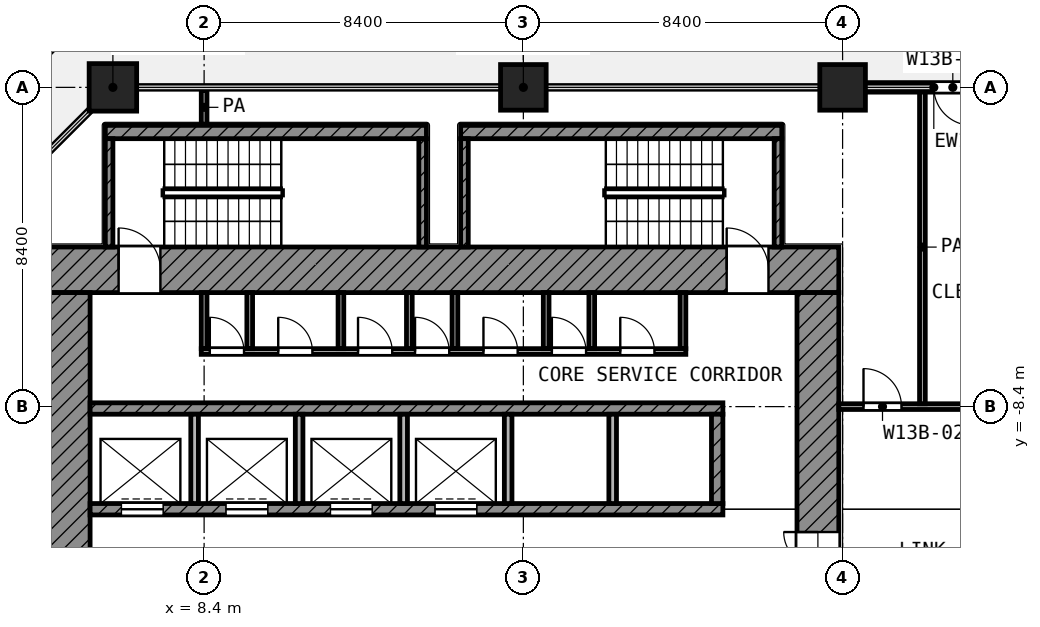
"""IFC4 building model, lengths in metres.
Left out: names, types, materials, properties, quantities, classifications, styles, units other than length and angle.
Written with IfcOpenShell. Run it as: python <this file> out.ifc"""

import sys

from ifc_helpers import new_model, si_unit, direction, frame, frame_2d, origin, origin_2d, place, context, subcontext, project, spatial, rectangle, extrude, element, fill, save


model = new_model("IFC4")
c1 = context("Model", 3, precision=1e-05, world=origin(), true_north=direction((0.0, 1.0)))
c2 = subcontext(c1, "Body", "Model", "MODEL_VIEW")
j1 = project(units=[si_unit("LENGTHUNIT", "METRE"), si_unit("PLANEANGLEUNIT", "RADIAN")], contexts=[c1])
p1 = place(None, origin())
s1 = spatial("IfcSite", under=j1, at=p1, CompositionType="ELEMENT")
p2 = place(p1, origin())
s2 = spatial("IfcBuilding", under=s1, at=p2, CompositionType="ELEMENT")
p3 = place(p2, frame((0.0, 0.0, 89.6)))
s3 = spatial("IfcBuildingStorey", under=s2, at=p3, CompositionType="ELEMENT", Elevation=89.6)
p4 = place(p3, frame((6.0, 0.0, 0.0), z_axis=(0.0, 0.0, 1.0), x_axis=(1.0, 0.0, 0.0)))
e1 = element("IfcColumn", 1, at=p4, inside=s3, PredefinedType="COLUMN", context=c2, shape_type="SweptSolid", body=[
    extrude(rectangle(XDim=1.25, YDim=1.25, at=origin_2d()), origin(), (0.0, 0.0, 1.0), 4.2),
])
for number, where, z_axis, x_axis in (
    (2, (16.8, 0.0, 0.0), (0.0, 0.0, 1.0), (1.0, 0.0, 0.0)),
    (3, (25.2, 0.0, 0.0), (0.0, 0.0, 1.0), (1.0, 0.0, 0.0)),
):
    element("IfcColumn", number, at=place(p3, frame(where, z_axis=z_axis, x_axis=x_axis)), inside=s3, PredefinedType="COLUMN", context=c2, shape_type="SweptSolid", body=[
        extrude(rectangle(XDim=1.2, YDim=1.2, at=origin_2d()), origin(), (0.0, 0.0, 1.0), 4.2),
    ])
p5 = place(p3, frame((29.4, 0.0, 0.0), z_axis=(0.0, 0.0, 1.0), x_axis=(-1.0, 0.0, 0.0)))
e4 = element("IfcWall", 4, at=p5, inside=s3, PredefinedType="SOLIDWALL", context=c2, shape_type="SweptSolid", body=[
    extrude(rectangle(XDim=3.6, YDim=0.25, at=frame_2d((1.8, 0.0))), origin(), (0.0, 0.0, 1.0), 3.58),
])
p6 = place(p5, frame((0.8, 0.0, 0.0)))
e5 = element("IfcOpeningElement", 5, at=p6, cuts=e4, PredefinedType="OPENING", context=c2, shape_type="SweptSolid", body=[
    extrude(rectangle(XDim=1.0, YDim=2.1, at=frame_2d((0.5, 1.05))), frame((0.0, 0.135, 0.0), z_axis=(0.0, -1.0, 0.0), x_axis=(1.0, 0.0, 0.0)), (0.0, 0.0, 1.0), 0.27),
])
p7 = place(p3, frame((4.2, -4.8, 0.0), z_axis=(0.0, 0.0, 1.0), x_axis=(1.0, 0.0, 0.0)))
e6 = element("IfcWall", 6, at=p7, inside=s3, PredefinedType="SHEAR", context=c2, shape_type="SweptSolid", body=[
    extrude(rectangle(XDim=20.9, YDim=1.2, at=frame_2d((10.45, 0.0))), origin(), (0.0, 0.0, 1.0), 3.7),
])
p8 = place(p7, frame((1.95, 0.0, 0.0)))
e7 = element("IfcOpeningElement", 7, at=p8, cuts=e6, PredefinedType="OPENING", context=c2, shape_type="SweptSolid", body=[
    extrude(rectangle(XDim=1.1, YDim=2.1, at=frame_2d((0.55, 1.05))), frame((0.0, 0.61, 0.0), z_axis=(0.0, -1.0, 0.0), x_axis=(1.0, 0.0, 0.0)), (0.0, 0.0, 1.0), 1.22),
])
p9 = place(p7, frame((17.95, 0.0, 0.0)))
e8 = element("IfcOpeningElement", 8, at=p9, cuts=e6, PredefinedType="OPENING", context=c2, shape_type="SweptSolid", body=[
    extrude(rectangle(XDim=1.1, YDim=2.1, at=frame_2d((0.55, 1.05))), frame((0.0, 0.61, 0.0), z_axis=(0.0, -1.0, 0.0), x_axis=(1.0, 0.0, 0.0)), (0.0, 0.0, 1.0), 1.22),
])
p10 = place(p3, frame((4.8, -25.1, 0.0), z_axis=(0.0, 0.0, 1.0), x_axis=(0.0, 1.0, 0.0)))
e9 = element("IfcWall", 9, at=p10, inside=s3, PredefinedType="SHEAR", context=c2, shape_type="SweptSolid", body=[
    extrude(rectangle(XDim=19.7, YDim=1.2, at=frame_2d((9.85, 0.0))), origin(), (0.0, 0.0, 1.0), 3.7),
])
p11 = place(p10, frame((11.55, 0.0, 0.0)))
e10 = element("IfcOpeningElement", 10, at=p11, cuts=e9, PredefinedType="OPENING", context=c2, shape_type="SweptSolid", body=[
    extrude(rectangle(XDim=1.1, YDim=2.1, at=frame_2d((0.55, 1.05))), frame((0.0, 0.61, 0.0), z_axis=(0.0, -1.0, 0.0), x_axis=(1.0, 0.0, 0.0)), (0.0, 0.0, 1.0), 1.22),
])
p12 = place(p10, frame((2.25, 0.0, 0.0)))
e11 = element("IfcOpeningElement", 11, at=p12, cuts=e9, PredefinedType="OPENING", context=c2, shape_type="SweptSolid", body=[
    extrude(rectangle(XDim=1.1, YDim=2.1, at=frame_2d((0.55, 1.05))), frame((0.0, 0.61, 0.0), z_axis=(0.0, -1.0, 0.0), x_axis=(1.0, 0.0, 0.0)), (0.0, 0.0, 1.0), 1.22),
])
p13 = place(p3, frame((24.55, -24.0, 0.0), z_axis=(0.0, 0.0, 1.0), x_axis=(0.0, 1.0, 0.0)))
e12 = element("IfcWall", 12, at=p13, inside=s3, PredefinedType="SHEAR", context=c2, shape_type="SweptSolid", body=[
    extrude(rectangle(XDim=18.6, YDim=1.1, at=frame_2d((9.3, 0.0))), origin(), (0.0, 0.0, 1.0), 3.7),
])
p14 = place(p13, frame((10.5, 0.0, 0.0)))
e13 = element("IfcOpeningElement", 13, at=p14, cuts=e12, PredefinedType="OPENING", context=c2, shape_type="SweptSolid", body=[
    extrude(rectangle(XDim=1.8, YDim=2.1, at=frame_2d((0.9, 1.05))), frame((0.0, 0.56, 0.0), z_axis=(0.0, -1.0, 0.0), x_axis=(1.0, 0.0, 0.0)), (0.0, 0.0, 1.0), 1.12),
])
p15 = place(p3, frame((5.4, -8.45, 0.0), z_axis=(0.0, 0.0, 1.0), x_axis=(1.0, 0.0, 0.0)))
e14 = element("IfcWall", 14, at=p15, inside=s3, PredefinedType="SHEAR", context=c2, shape_type="SweptSolid", body=[
    extrude(rectangle(XDim=16.65, YDim=0.3, at=frame_2d((8.325, 0.0))), origin(), (0.0, 0.0, 1.0), 3.7),
])
p16 = place(p3, frame((5.4, -11.1, 0.0), z_axis=(0.0, 0.0, 1.0), x_axis=(1.0, 0.0, 0.0)))
e15 = element("IfcWall", 15, at=p16, inside=s3, PredefinedType="SHEAR", context=c2, shape_type="SweptSolid", body=[
    extrude(rectangle(XDim=16.65, YDim=0.3, at=frame_2d((8.325, 0.0))), origin(), (0.0, 0.0, 1.0), 3.7),
])
p17 = place(p16, frame((0.825, 0.0, 0.0)))
e16 = element("IfcOpeningElement", 16, at=p17, cuts=e15, PredefinedType="OPENING", context=c2, shape_type="SweptSolid", body=[
    extrude(rectangle(XDim=1.1, YDim=2.1, at=frame_2d((0.55, 1.05))), frame((0.0, 0.16, 0.0), z_axis=(0.0, -1.0, 0.0), x_axis=(1.0, 0.0, 0.0)), (0.0, 0.0, 1.0), 0.32),
])
p18 = place(p16, frame((3.575, 0.0, 0.0)))
e17 = element("IfcOpeningElement", 17, at=p18, cuts=e15, PredefinedType="OPENING", context=c2, shape_type="SweptSolid", body=[
    extrude(rectangle(XDim=1.1, YDim=2.1, at=frame_2d((0.55, 1.05))), frame((0.0, 0.16, 0.0), z_axis=(0.0, -1.0, 0.0), x_axis=(1.0, 0.0, 0.0)), (0.0, 0.0, 1.0), 0.32),
])
p19 = place(p16, frame((6.325, 0.0, 0.0)))
e18 = element("IfcOpeningElement", 18, at=p19, cuts=e15, PredefinedType="OPENING", context=c2, shape_type="SweptSolid", body=[
    extrude(rectangle(XDim=1.1, YDim=2.1, at=frame_2d((0.55, 1.05))), frame((0.0, 0.16, 0.0), z_axis=(0.0, -1.0, 0.0), x_axis=(1.0, 0.0, 0.0)), (0.0, 0.0, 1.0), 0.32),
])
p20 = place(p16, frame((9.075, 0.0, 0.0)))
e19 = element("IfcOpeningElement", 19, at=p20, cuts=e15, PredefinedType="OPENING", context=c2, shape_type="SweptSolid", body=[
    extrude(rectangle(XDim=1.1, YDim=2.1, at=frame_2d((0.55, 1.05))), frame((0.0, 0.16, 0.0), z_axis=(0.0, -1.0, 0.0), x_axis=(1.0, 0.0, 0.0)), (0.0, 0.0, 1.0), 0.32),
])
p21 = place(p3, frame((21.9, -10.95, 0.0), z_axis=(0.0, 0.0, 1.0), x_axis=(0.0, 1.0, 0.0)))
e20 = element("IfcWall", 20, at=p21, inside=s3, PredefinedType="SHEAR", context=c2, shape_type="SweptSolid", body=[
    extrude(rectangle(XDim=2.35, YDim=0.3, at=frame_2d((1.175, 0.0))), origin(), (0.0, 0.0, 1.0), 3.7),
])
for number, where, z_axis, x_axis in (
    (21, (8.15, -10.95, 0.0), (0.0, 0.0, 1.0), (0.0, 1.0, 0.0)),
    (22, (10.9, -10.95, 0.0), (0.0, 0.0, 1.0), (0.0, 1.0, 0.0)),
    (23, (13.65, -10.95, 0.0), (0.0, 0.0, 1.0), (0.0, 1.0, 0.0)),
    (24, (16.4, -10.95, 0.0), (0.0, 0.0, 1.0), (0.0, 1.0, 0.0)),
    (25, (19.15, -10.95, 0.0), (0.0, 0.0, 1.0), (0.0, 1.0, 0.0)),
):
    element("IfcWall", number, at=place(p3, frame(where, z_axis=z_axis, x_axis=x_axis)), inside=s3, PredefinedType="PARTITIONING", context=c2, shape_type="SweptSolid", body=[
        extrude(rectangle(XDim=2.35, YDim=0.2, at=frame_2d((1.175, 0.0))), origin(), (0.0, 0.0, 1.0), 3.7),
    ])
p22 = place(p3, frame((8.325, -6.95, 0.0), z_axis=(0.0, 0.0, 1.0), x_axis=(1.0, 0.0, 0.0)))
e26 = element("IfcWall", 26, at=p22, inside=s3, PredefinedType="PARTITIONING", context=c2, shape_type="SweptSolid", body=[
    extrude(rectangle(XDim=12.75, YDim=0.15, at=frame_2d((6.375, 0.0))), origin(), (0.0, 0.0, 1.0), 3.7),
])
p23 = place(p22, frame((0.225, 0.0, 0.0)))
e27 = element("IfcOpeningElement", 27, at=p23, cuts=e26, PredefinedType="OPENING", context=c2, shape_type="SweptSolid", body=[
    extrude(rectangle(XDim=0.9, YDim=2.1, at=frame_2d((0.45, 1.05))), frame((0.0, 0.085, 0.0), z_axis=(0.0, -1.0, 0.0), x_axis=(1.0, 0.0, 0.0)), (0.0, 0.0, 1.0), 0.17),
])
p24 = place(p22, frame((2.025, 0.0, 0.0)))
e28 = element("IfcOpeningElement", 28, at=p24, cuts=e26, PredefinedType="OPENING", context=c2, shape_type="SweptSolid", body=[
    extrude(rectangle(XDim=0.9, YDim=2.1, at=frame_2d((0.45, 1.05))), frame((0.0, 0.085, 0.0), z_axis=(0.0, -1.0, 0.0), x_axis=(1.0, 0.0, 0.0)), (0.0, 0.0, 1.0), 0.17),
])
p25 = place(p22, frame((4.125, 0.0, 0.0)))
e29 = element("IfcOpeningElement", 29, at=p25, cuts=e26, PredefinedType="OPENING", context=c2, shape_type="SweptSolid", body=[
    extrude(rectangle(XDim=0.9, YDim=2.1, at=frame_2d((0.45, 1.05))), frame((0.0, 0.085, 0.0), z_axis=(0.0, -1.0, 0.0), x_axis=(1.0, 0.0, 0.0)), (0.0, 0.0, 1.0), 0.17),
])
p26 = place(p22, frame((5.625, 0.0, 0.0)))
e30 = element("IfcOpeningElement", 30, at=p26, cuts=e26, PredefinedType="OPENING", context=c2, shape_type="SweptSolid", body=[
    extrude(rectangle(XDim=0.9, YDim=2.1, at=frame_2d((0.45, 1.05))), frame((0.0, 0.085, 0.0), z_axis=(0.0, -1.0, 0.0), x_axis=(1.0, 0.0, 0.0)), (0.0, 0.0, 1.0), 0.17),
])
p27 = place(p22, frame((7.425, 0.0, 0.0)))
e31 = element("IfcOpeningElement", 31, at=p27, cuts=e26, PredefinedType="OPENING", context=c2, shape_type="SweptSolid", body=[
    extrude(rectangle(XDim=0.9, YDim=2.1, at=frame_2d((0.45, 1.05))), frame((0.0, 0.085, 0.0), z_axis=(0.0, -1.0, 0.0), x_axis=(1.0, 0.0, 0.0)), (0.0, 0.0, 1.0), 0.17),
])
p28 = place(p22, frame((9.225, 0.0, 0.0)))
e32 = element("IfcOpeningElement", 32, at=p28, cuts=e26, PredefinedType="OPENING", context=c2, shape_type="SweptSolid", body=[
    extrude(rectangle(XDim=0.9, YDim=2.1, at=frame_2d((0.45, 1.05))), frame((0.0, 0.085, 0.0), z_axis=(0.0, -1.0, 0.0), x_axis=(1.0, 0.0, 0.0)), (0.0, 0.0, 1.0), 0.17),
])
p29 = place(p22, frame((11.025, 0.0, 0.0)))
e33 = element("IfcOpeningElement", 33, at=p29, cuts=e26, PredefinedType="OPENING", context=c2, shape_type="SweptSolid", body=[
    extrude(rectangle(XDim=0.9, YDim=2.1, at=frame_2d((0.45, 1.05))), frame((0.0, 0.085, 0.0), z_axis=(0.0, -1.0, 0.0), x_axis=(1.0, 0.0, 0.0)), (0.0, 0.0, 1.0), 0.17),
])
for number, where, z_axis, x_axis in (
    (34, (8.4, -6.875, 0.0), (0.0, 0.0, 1.0), (0.0, 1.0, 0.0)),
    (35, (9.6, -6.875, 0.0), (0.0, 0.0, 1.0), (0.0, 1.0, 0.0)),
    (36, (12.0, -6.875, 0.0), (0.0, 0.0, 1.0), (0.0, 1.0, 0.0)),
    (37, (13.8, -6.875, 0.0), (0.0, 0.0, 1.0), (0.0, 1.0, 0.0)),
    (38, (15.0, -6.875, 0.0), (0.0, 0.0, 1.0), (0.0, 1.0, 0.0)),
    (39, (17.4, -6.875, 0.0), (0.0, 0.0, 1.0), (0.0, 1.0, 0.0)),
    (40, (18.6, -6.875, 0.0), (0.0, 0.0, 1.0), (0.0, 1.0, 0.0)),
    (41, (21.0, -6.875, 0.0), (0.0, 0.0, 1.0), (0.0, 1.0, 0.0)),
):
    element("IfcWall", number, at=place(p3, frame(where, z_axis=z_axis, x_axis=x_axis)), inside=s3, PredefinedType="PARTITIONING", context=c2, shape_type="SweptSolid", body=[
        extrude(rectangle(XDim=1.475, YDim=0.15, at=frame_2d((0.738, 0.0))), origin(), (0.0, 0.0, 1.0), 3.7),
    ])
p30 = place(p3, frame((5.8, -1.175, 0.0), z_axis=(0.0, 0.0, 1.0), x_axis=(1.0, 0.0, 0.0)))
e42 = element("IfcWall", 42, at=p30, inside=s3, PredefinedType="SHEAR", context=c2, shape_type="SweptSolid", body=[
    extrude(rectangle(XDim=8.45, YDim=0.35, at=frame_2d((4.225, 0.0))), origin(), (0.0, 0.0, 1.0), 3.7),
])
for number, where, z_axis, x_axis in (
    (43, (5.9, -4.2, 0.0), (0.0, 0.0, 1.0), (0.0, 1.0, 0.0)),
    (44, (14.15, -4.2, 0.0), (0.0, 0.0, 1.0), (0.0, 1.0, 0.0)),
):
    element("IfcWall", number, at=place(p3, frame(where, z_axis=z_axis, x_axis=x_axis)), inside=s3, PredefinedType="SHEAR", context=c2, shape_type="SweptSolid", body=[
        extrude(rectangle(XDim=2.85, YDim=0.2, at=frame_2d((1.425, 0.0))), origin(), (0.0, 0.0, 1.0), 3.7),
    ])
p31 = place(p3, frame((15.15, -1.175, 0.0), z_axis=(0.0, 0.0, 1.0), x_axis=(1.0, 0.0, 0.0)))
e45 = element("IfcWall", 45, at=p31, inside=s3, PredefinedType="SHEAR", context=c2, shape_type="SweptSolid", body=[
    extrude(rectangle(XDim=8.45, YDim=0.35, at=frame_2d((4.225, 0.0))), origin(), (0.0, 0.0, 1.0), 3.7),
])
for number, where, z_axis, x_axis in (
    (46, (15.25, -4.2, 0.0), (0.0, 0.0, 1.0), (0.0, 1.0, 0.0)),
    (47, (23.5, -4.2, 0.0), (0.0, 0.0, 1.0), (0.0, 1.0, 0.0)),
):
    element("IfcWall", number, at=place(p3, frame(where, z_axis=z_axis, x_axis=x_axis)), inside=s3, PredefinedType="SHEAR", context=c2, shape_type="SweptSolid", body=[
        extrude(rectangle(XDim=2.85, YDim=0.2, at=frame_2d((1.425, 0.0))), origin(), (0.0, 0.0, 1.0), 3.7),
    ])
p32 = place(p3, frame((25.1, -8.4, 0.0), z_axis=(0.0, 0.0, 1.0), x_axis=(1.0, 0.0, 0.0)))
e48 = element("IfcWall", 48, at=p32, inside=s3, PredefinedType="PARTITIONING", context=c2, shape_type="SweptSolid", body=[
    extrude(rectangle(XDim=14.932, YDim=0.15, at=frame_2d((7.466, 0.0))), origin(), (0.0, 0.0, 1.0), 3.7),
])
p33 = place(p32, frame((10.0, 0.0, 0.0)))
e49 = element("IfcOpeningElement", 49, at=p33, cuts=e48, PredefinedType="OPENING", context=c2, shape_type="SweptSolid", body=[
    extrude(rectangle(XDim=1.2, YDim=2.1, at=frame_2d((0.6, 1.05))), frame((0.0, 0.085, 0.0), z_axis=(0.0, -1.0, 0.0), x_axis=(1.0, 0.0, 0.0)), (0.0, 0.0, 1.0), 0.17),
])
p34 = place(p32, frame((0.65, 0.0, 0.0)))
e50 = element("IfcOpeningElement", 50, at=p34, cuts=e48, PredefinedType="OPENING", context=c2, shape_type="SweptSolid", body=[
    extrude(rectangle(XDim=1.0, YDim=2.1, at=frame_2d((0.5, 1.05))), frame((0.0, 0.085, 0.0), z_axis=(0.0, -1.0, 0.0), x_axis=(1.0, 0.0, 0.0)), (0.0, 0.0, 1.0), 0.17),
])
p35 = place(p32, frame((4.85, 0.0, 0.0)))
e51 = element("IfcOpeningElement", 51, at=p35, cuts=e48, PredefinedType="OPENING", context=c2, shape_type="SweptSolid", body=[
    extrude(rectangle(XDim=1.0, YDim=2.1, at=frame_2d((0.5, 1.05))), frame((0.0, 0.085, 0.0), z_axis=(0.0, -1.0, 0.0), x_axis=(1.0, 0.0, 0.0)), (0.0, 0.0, 1.0), 0.17),
])
p36 = place(p3, frame((8.4, -0.97, 0.0), z_axis=(0.0, 0.0, 1.0), x_axis=(0.0, 1.0, 0.0)))
e52 = element("IfcWall", 52, at=p36, inside=s3, PredefinedType="PARTITIONING", context=c2, shape_type="SweptSolid", body=[
    extrude(rectangle(XDim=0.89, YDim=0.15, at=frame_2d((0.445, 0.0))), origin(), (0.0, 0.0, 1.0), 3.7),
])
p37 = place(p3, frame((27.3, -8.325, 0.0), z_axis=(0.0, 0.0, 1.0), x_axis=(0.0, 1.0, 0.0)))
e53 = element("IfcWall", 53, at=p37, inside=s3, PredefinedType="PARTITIONING", context=c2, shape_type="SweptSolid", body=[
    extrude(rectangle(XDim=8.245, YDim=0.15, at=frame_2d((4.123, 0.0))), origin(), (0.0, 0.0, 1.0), 3.7),
])
p38 = place(p6, origin())
e54 = element("IfcDoor", 54, at=p38, inside=s3, OperationType="SINGLE_SWING_LEFT", PredefinedType="DOOR", context=c2, shape_type="SweptSolid", body=[
    extrude(rectangle(XDim=1.0, YDim=2.1, at=frame_2d((0.5, 1.05))), frame((0.0, 0.025, 0.0), z_axis=(0.0, -1.0, 0.0), x_axis=(1.0, 0.0, 0.0)), (0.0, 0.0, 1.0), 0.05),
])
fill(e5, e54)
p39 = place(p17, origin())
e55 = element("IfcDoor", 55, at=p39, inside=s3, OperationType="DOUBLE_DOOR_SLIDING", PredefinedType="DOOR", context=c2, shape_type="SweptSolid", body=[
    extrude(rectangle(XDim=1.1, YDim=2.1, at=frame_2d((0.55, 1.05))), frame((0.0, 0.025, 0.0), z_axis=(0.0, -1.0, 0.0), x_axis=(1.0, 0.0, 0.0)), (0.0, 0.0, 1.0), 0.05),
])
fill(e16, e55)
p40 = place(p18, origin())
e56 = element("IfcDoor", 56, at=p40, inside=s3, OperationType="DOUBLE_DOOR_SLIDING", PredefinedType="DOOR", context=c2, shape_type="SweptSolid", body=[
    extrude(rectangle(XDim=1.1, YDim=2.1, at=frame_2d((0.55, 1.05))), frame((0.0, 0.025, 0.0), z_axis=(0.0, -1.0, 0.0), x_axis=(1.0, 0.0, 0.0)), (0.0, 0.0, 1.0), 0.05),
])
fill(e17, e56)
p41 = place(p19, origin())
e57 = element("IfcDoor", 57, at=p41, inside=s3, OperationType="DOUBLE_DOOR_SLIDING", PredefinedType="DOOR", context=c2, shape_type="SweptSolid", body=[
    extrude(rectangle(XDim=1.1, YDim=2.1, at=frame_2d((0.55, 1.05))), frame((0.0, 0.025, 0.0), z_axis=(0.0, -1.0, 0.0), x_axis=(1.0, 0.0, 0.0)), (0.0, 0.0, 1.0), 0.05),
])
fill(e18, e57)
p42 = place(p20, origin())
e58 = element("IfcDoor", 58, at=p42, inside=s3, OperationType="DOUBLE_DOOR_SLIDING", PredefinedType="DOOR", context=c2, shape_type="SweptSolid", body=[
    extrude(rectangle(XDim=1.1, YDim=2.1, at=frame_2d((0.55, 1.05))), frame((0.0, 0.025, 0.0), z_axis=(0.0, -1.0, 0.0), x_axis=(1.0, 0.0, 0.0)), (0.0, 0.0, 1.0), 0.05),
])
fill(e19, e58)
p43 = place(p8, origin())
e59 = element("IfcDoor", 59, at=p43, inside=s3, OperationType="SINGLE_SWING_LEFT", PredefinedType="DOOR", context=c2, shape_type="SweptSolid", body=[
    extrude(rectangle(XDim=1.1, YDim=2.1, at=frame_2d((0.55, 1.05))), frame((0.0, 0.025, 0.0), z_axis=(0.0, -1.0, 0.0), x_axis=(1.0, 0.0, 0.0)), (0.0, 0.0, 1.0), 0.05),
])
fill(e7, e59)
p44 = place(p9, origin())
e60 = element("IfcDoor", 60, at=p44, inside=s3, OperationType="SINGLE_SWING_LEFT", PredefinedType="DOOR", context=c2, shape_type="SweptSolid", body=[
    extrude(rectangle(XDim=1.1, YDim=2.1, at=frame_2d((0.55, 1.05))), frame((0.0, 0.025, 0.0), z_axis=(0.0, -1.0, 0.0), x_axis=(1.0, 0.0, 0.0)), (0.0, 0.0, 1.0), 0.05),
])
fill(e8, e60)
p45 = place(p14, origin())
e61 = element("IfcDoor", 61, at=p45, inside=s3, OperationType="DOUBLE_DOOR_SINGLE_SWING", PredefinedType="DOOR", context=c2, shape_type="SweptSolid", body=[
    extrude(rectangle(XDim=1.8, YDim=2.1, at=frame_2d((0.9, 1.05))), frame((0.0, 0.025, 0.0), z_axis=(0.0, -1.0, 0.0), x_axis=(1.0, 0.0, 0.0)), (0.0, 0.0, 1.0), 0.05),
])
fill(e13, e61)
p46 = place(p23, origin())
e62 = element("IfcDoor", 62, at=p46, inside=s3, OperationType="SINGLE_SWING_LEFT", PredefinedType="DOOR", context=c2, shape_type="SweptSolid", body=[
    extrude(rectangle(XDim=0.9, YDim=2.1, at=frame_2d((0.45, 1.05))), frame((0.0, 0.025, 0.0), z_axis=(0.0, -1.0, 0.0), x_axis=(1.0, 0.0, 0.0)), (0.0, 0.0, 1.0), 0.05),
])
fill(e27, e62)
p47 = place(p24, origin())
e63 = element("IfcDoor", 63, at=p47, inside=s3, OperationType="SINGLE_SWING_LEFT", PredefinedType="DOOR", context=c2, shape_type="SweptSolid", body=[
    extrude(rectangle(XDim=0.9, YDim=2.1, at=frame_2d((0.45, 1.05))), frame((0.0, 0.025, 0.0), z_axis=(0.0, -1.0, 0.0), x_axis=(1.0, 0.0, 0.0)), (0.0, 0.0, 1.0), 0.05),
])
fill(e28, e63)
p48 = place(p25, origin())
e64 = element("IfcDoor", 64, at=p48, inside=s3, OperationType="SINGLE_SWING_LEFT", PredefinedType="DOOR", context=c2, shape_type="SweptSolid", body=[
    extrude(rectangle(XDim=0.9, YDim=2.1, at=frame_2d((0.45, 1.05))), frame((0.0, 0.025, 0.0), z_axis=(0.0, -1.0, 0.0), x_axis=(1.0, 0.0, 0.0)), (0.0, 0.0, 1.0), 0.05),
])
fill(e29, e64)
p49 = place(p26, origin())
e65 = element("IfcDoor", 65, at=p49, inside=s3, OperationType="SINGLE_SWING_LEFT", PredefinedType="DOOR", context=c2, shape_type="SweptSolid", body=[
    extrude(rectangle(XDim=0.9, YDim=2.1, at=frame_2d((0.45, 1.05))), frame((0.0, 0.025, 0.0), z_axis=(0.0, -1.0, 0.0), x_axis=(1.0, 0.0, 0.0)), (0.0, 0.0, 1.0), 0.05),
])
fill(e30, e65)
p50 = place(p27, origin())
e66 = element("IfcDoor", 66, at=p50, inside=s3, OperationType="SINGLE_SWING_LEFT", PredefinedType="DOOR", context=c2, shape_type="SweptSolid", body=[
    extrude(rectangle(XDim=0.9, YDim=2.1, at=frame_2d((0.45, 1.05))), frame((0.0, 0.025, 0.0), z_axis=(0.0, -1.0, 0.0), x_axis=(1.0, 0.0, 0.0)), (0.0, 0.0, 1.0), 0.05),
])
fill(e31, e66)
p51 = place(p28, origin())
e67 = element("IfcDoor", 67, at=p51, inside=s3, OperationType="SINGLE_SWING_LEFT", PredefinedType="DOOR", context=c2, shape_type="SweptSolid", body=[
    extrude(rectangle(XDim=0.9, YDim=2.1, at=frame_2d((0.45, 1.05))), frame((0.0, 0.025, 0.0), z_axis=(0.0, -1.0, 0.0), x_axis=(1.0, 0.0, 0.0)), (0.0, 0.0, 1.0), 0.05),
])
fill(e32, e67)
p52 = place(p29, origin())
e68 = element("IfcDoor", 68, at=p52, inside=s3, OperationType="SINGLE_SWING_LEFT", PredefinedType="DOOR", context=c2, shape_type="SweptSolid", body=[
    extrude(rectangle(XDim=0.9, YDim=2.1, at=frame_2d((0.45, 1.05))), frame((0.0, 0.025, 0.0), z_axis=(0.0, -1.0, 0.0), x_axis=(1.0, 0.0, 0.0)), (0.0, 0.0, 1.0), 0.05),
])
fill(e33, e68)
p53 = place(p34, origin())
e69 = element("IfcDoor", 69, at=p53, inside=s3, OperationType="SINGLE_SWING_LEFT", PredefinedType="DOOR", context=c2, shape_type="SweptSolid", body=[
    extrude(rectangle(XDim=1.0, YDim=2.1, at=frame_2d((0.5, 1.05))), frame((0.0, 0.025, 0.0), z_axis=(0.0, -1.0, 0.0), x_axis=(1.0, 0.0, 0.0)), (0.0, 0.0, 1.0), 0.05),
])
fill(e50, e69)
save(model, sys.argv[1])
